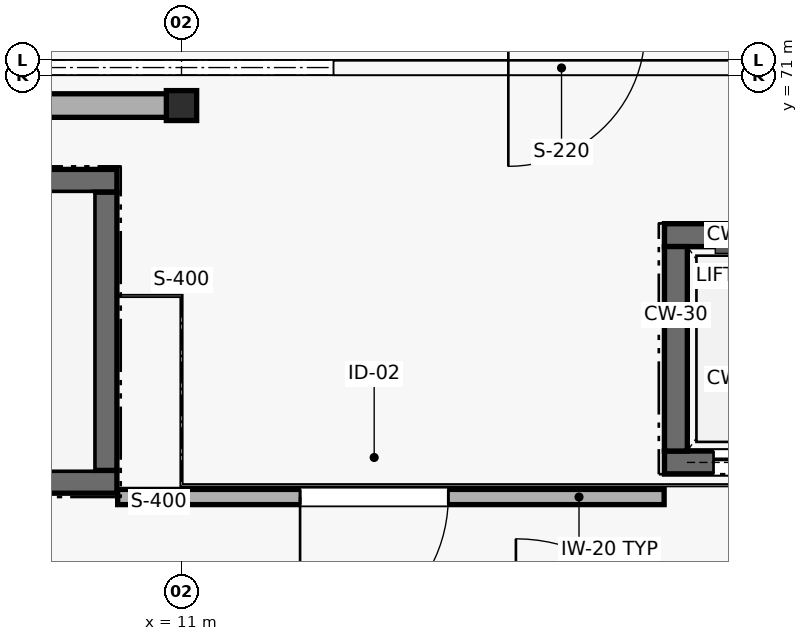
"""IFC4 building model, lengths in metres.
Left out: names, types, materials, properties, quantities, classifications, styles, units other than length and angle.
Written with IfcOpenShell. Run it as: python <this file> out.ifc"""

import sys

from ifc_helpers import new_model, si_unit, direction, frame, frame_2d, origin, origin_2d, place, context, subcontext, project, spatial, rectangle, i_section, extrude, element, fill, save


model = new_model("IFC4")
c1 = context("Model", 3, precision=1e-05, world=origin(), true_north=direction((0.0, 1.0)))
c2 = subcontext(c1, "Body", "Model", "MODEL_VIEW")
j1 = project(units=[si_unit("LENGTHUNIT", "METRE"), si_unit("PLANEANGLEUNIT", "RADIAN")], contexts=[c1])
p1 = place(None, origin())
s1 = spatial("IfcSite", under=j1, at=p1, CompositionType="ELEMENT")
p2 = place(p1, origin())
s2 = spatial("IfcBuilding", under=s1, at=p2, CompositionType="ELEMENT")
p3 = place(p2, origin())
s3 = spatial("IfcBuildingStorey", under=s2, at=p3, CompositionType="ELEMENT", Elevation=0.0)
p4 = place(p3, frame((11.0, 70.6, 0.0), z_axis=(0.0, 0.0, 1.0), x_axis=(1.0, 0.0, 0.0)))
e1 = element("IfcColumn", 1, at=p4, inside=s3, PredefinedType="COLUMN", context=c2, shape_type="SweptSolid", body=[
    extrude(i_section(OverallWidth=0.399, OverallDepth=0.394, WebThickness=0.023, FlangeThickness=0.037, FilletRadius=0.018, at=origin_2d()), origin(), (0.0, 0.0, 1.0), 5.4),
])
p5 = place(p3, frame((10.991, 70.6, 0.0), z_axis=(0.0, 0.0, 1.0), x_axis=(-1.0, 0.0, 0.0)))
e2 = element("IfcWall", 2, at=p5, inside=s3, PredefinedType="SOLIDWALL", context=c2, shape_type="SweptSolid", body=[
    extrude(rectangle(XDim=10.981, YDim=0.31, at=frame_2d((5.491, 0.0))), origin(), (0.0, 0.0, 1.0), 4.315),
])
p6 = place(p5, frame((2.591, 0.0, 1.05)))
e3 = element("IfcOpeningElement", 3, at=p6, cuts=e2, PredefinedType="OPENING", context=c2, shape_type="SweptSolid", body=[
    extrude(rectangle(XDim=1.8, YDim=1.8, at=frame_2d((0.9, 0.9))), frame((0.0, 0.165, 0.0), z_axis=(0.0, -1.0, 0.0), x_axis=(1.0, 0.0, 0.0)), (0.0, 0.0, 1.0), 0.33),
])
p7 = place(p5, frame((6.291, 0.0, 1.05)))
e4 = element("IfcOpeningElement", 4, at=p7, cuts=e2, PredefinedType="OPENING", context=c2, shape_type="SweptSolid", body=[
    extrude(rectangle(XDim=1.8, YDim=1.8, at=frame_2d((0.9, 0.9))), frame((0.0, 0.165, 0.0), z_axis=(0.0, -1.0, 0.0), x_axis=(1.0, 0.0, 0.0)), (0.0, 0.0, 1.0), 0.33),
])
p8 = place(p3, frame((1.5, 65.65, 0.0), z_axis=(0.0, 0.0, 1.0), x_axis=(1.0, 0.0, 0.0)))
e5 = element("IfcWall", 5, at=p8, inside=s3, PredefinedType="SHEAR", context=c2, shape_type="SweptSolid", body=[
    extrude(rectangle(XDim=8.65, YDim=0.3, at=frame_2d((4.325, 0.0))), origin(), (0.0, 0.0, 1.0), 5.1),
])
p9 = place(p8, frame((0.55, 0.0, 0.0)))
e6 = element("IfcOpeningElement", 6, at=p9, cuts=e5, PredefinedType="OPENING", context=c2, shape_type="SweptSolid", body=[
    extrude(rectangle(XDim=1.35, YDim=2.2, at=frame_2d((0.675, 1.1))), frame((0.0, 0.16, 0.0), z_axis=(0.0, -1.0, 0.0), x_axis=(1.0, 0.0, 0.0)), (0.0, 0.0, 1.0), 0.32),
])
p10 = place(p3, frame((10.15, 69.61, 0.0), z_axis=(0.0, 0.0, 1.0), x_axis=(-1.0, 0.0, 0.0)))
e7 = element("IfcWall", 7, at=p10, inside=s3, PredefinedType="SHEAR", context=c2, shape_type="SweptSolid", body=[
    extrude(rectangle(XDim=8.65, YDim=0.3, at=frame_2d((4.325, 0.0))), origin(), (0.0, 0.0, 1.0), 5.1),
])
p11 = place(p3, frame((10.0, 65.8, 0.0), z_axis=(0.0, 0.0, 1.0), x_axis=(0.0, 1.0, 0.0)))
e8 = element("IfcWall", 8, at=p11, inside=s3, PredefinedType="SHEAR", context=c2, shape_type="SweptSolid", body=[
    extrude(rectangle(XDim=3.66, YDim=0.3, at=frame_2d((1.83, 0.0))), origin(), (0.0, 0.0, 1.0), 5.1),
])
for number, where, z_axis, x_axis in (
    (9, (17.355, 65.905, -1.4), (0.0, 0.0, 1.0), (1.0, 0.0, 0.0)),
    (10, (19.845, 68.895, -1.4), (0.0, 0.0, 1.0), (-1.0, 0.0, 0.0)),
):
    element("IfcWall", number, at=place(p3, frame(where, z_axis=z_axis, x_axis=x_axis)), inside=s3, PredefinedType="SHEAR", context=c2, shape_type="SweptSolid", body=[
        extrude(rectangle(XDim=2.49, YDim=0.3, at=frame_2d((1.245, 0.0))), origin(), (0.0, 0.0, 1.0), 1.0),
    ])
p12 = place(p3, frame((17.505, 68.745, -1.4), z_axis=(0.0, 0.0, 1.0), x_axis=(0.0, -1.0, 0.0)))
e11 = element("IfcWall", 11, at=p12, inside=s3, PredefinedType="SHEAR", context=c2, shape_type="SweptSolid", body=[
    extrude(rectangle(XDim=2.69, YDim=0.3, at=frame_2d((1.345, 0.0))), origin(), (0.0, 0.0, 1.0), 1.0),
])
p13 = place(p3, frame((17.355, 65.905, 0.0), z_axis=(0.0, 0.0, 1.0), x_axis=(1.0, 0.0, 0.0)))
e12 = element("IfcWall", 12, at=p13, inside=s3, PredefinedType="SHEAR", context=c2, shape_type="SweptSolid", body=[
    extrude(rectangle(XDim=2.49, YDim=0.3, at=frame_2d((1.245, 0.0))), origin(), (0.0, 0.0, 1.0), 5.1),
])
p14 = place(p13, frame((0.645, 0.0, 0.0)))
e13 = element("IfcOpeningElement", 13, at=p14, cuts=e12, PredefinedType="OPENING", context=c2, shape_type="SweptSolid", body=[
    extrude(rectangle(XDim=1.2, YDim=2.15, at=frame_2d((0.6, 1.075))), frame((0.0, 0.16, 0.0), z_axis=(0.0, -1.0, 0.0), x_axis=(1.0, 0.0, 0.0)), (0.0, 0.0, 1.0), 0.32),
])
p15 = place(p3, frame((19.845, 68.895, 0.0), z_axis=(0.0, 0.0, 1.0), x_axis=(-1.0, 0.0, 0.0)))
e14 = element("IfcWall", 14, at=p15, inside=s3, PredefinedType="SHEAR", context=c2, shape_type="SweptSolid", body=[
    extrude(rectangle(XDim=2.49, YDim=0.3, at=frame_2d((1.245, 0.0))), origin(), (0.0, 0.0, 1.0), 5.1),
])
p16 = place(p3, frame((17.505, 68.745, 0.0), z_axis=(0.0, 0.0, 1.0), x_axis=(0.0, -1.0, 0.0)))
e15 = element("IfcWall", 15, at=p16, inside=s3, PredefinedType="SHEAR", context=c2, shape_type="SweptSolid", body=[
    extrude(rectangle(XDim=2.69, YDim=0.3, at=frame_2d((1.345, 0.0))), origin(), (0.0, 0.0, 1.0), 5.1),
])
p17 = place(p3, frame((10.16, 65.45, 0.0), z_axis=(0.0, 0.0, 1.0), x_axis=(1.0, 0.0, 0.0)))
e16 = element("IfcWall", 16, at=p17, inside=s3, PredefinedType="PARTITIONING", context=c2, shape_type="SweptSolid", body=[
    extrude(rectangle(XDim=7.19, YDim=0.2, at=frame_2d((3.595, 0.0))), origin(), (0.0, 0.0, 1.0), 4.483),
])
p18 = place(p17, frame((2.4, 0.0, 0.0)))
e17 = element("IfcOpeningElement", 17, at=p18, cuts=e16, PredefinedType="OPENING", context=c2, shape_type="SweptSolid", body=[
    extrude(rectangle(XDim=1.95, YDim=2.45, at=frame_2d((0.975, 1.225))), frame((0.0, 0.11, 0.0), z_axis=(0.0, -1.0, 0.0), x_axis=(1.0, 0.0, 0.0)), (0.0, 0.0, 1.0), 0.22),
])
p19 = place(p14, frame((1.2, 0.0, 0.0), z_axis=(0.0, 0.0, 1.0), x_axis=(-1.0, 0.0, 0.0)))
e18 = element("IfcDoor", 18, at=p19, inside=s3, OperationType="DOUBLE_DOOR_SLIDING", PredefinedType="DOOR", context=c2, shape_type="SweptSolid", body=[
    extrude(rectangle(XDim=1.2, YDim=2.15, at=frame_2d((0.6, 1.075))), frame((0.0, 0.025, 0.0), z_axis=(0.0, -1.0, 0.0), x_axis=(1.0, 0.0, 0.0)), (0.0, 0.0, 1.0), 0.05),
])
fill(e13, e18)
p20 = place(p18, frame((1.95, 0.0, 0.0), z_axis=(0.0, 0.0, 1.0), x_axis=(-1.0, 0.0, 0.0)))
e19 = element("IfcDoor", 19, at=p20, inside=s3, OperationType="SINGLE_SWING_RIGHT", PredefinedType="DOOR", context=c2, shape_type="SweptSolid", body=[
    extrude(rectangle(XDim=1.95, YDim=2.45, at=frame_2d((0.975, 1.225))), frame((0.0, 0.025, 0.0), z_axis=(0.0, -1.0, 0.0), x_axis=(1.0, 0.0, 0.0)), (0.0, 0.0, 1.0), 0.05),
])
fill(e17, e19)
save(model, sys.argv[1])
